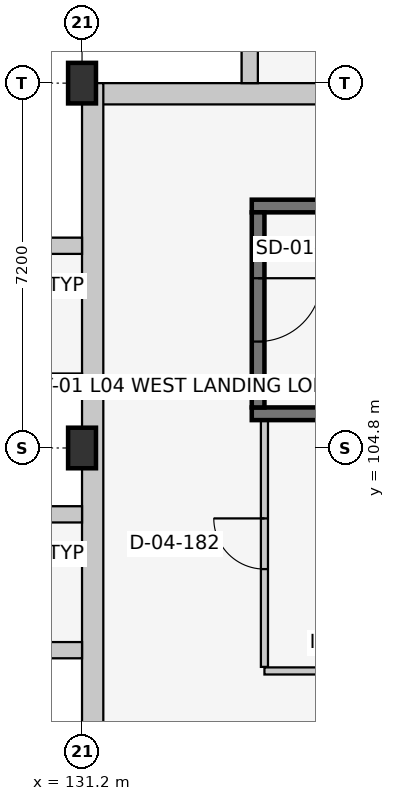
"""IFC4 building model, lengths in metres.
Left out: names, types, materials, properties, quantities, classifications, styles, units other than length and angle.
Written with IfcOpenShell. Run it as: python <this file> out.ifc"""

import sys

from ifc_helpers import new_model, si_unit, direction, frame, frame_2d, origin, origin_2d, place, context, subcontext, project, spatial, rectangle, extrude, element, fill, save


model = new_model("IFC4")
c1 = context("Model", 3, precision=1e-05, world=origin(), true_north=direction((0.0, 1.0)))
c2 = subcontext(c1, "Body", "Model", "MODEL_VIEW")
j1 = project(units=[si_unit("LENGTHUNIT", "METRE"), si_unit("PLANEANGLEUNIT", "RADIAN")], contexts=[c1])
p1 = place(None, origin())
s1 = spatial("IfcSite", under=j1, at=p1, CompositionType="ELEMENT")
p2 = place(p1, origin())
s2 = spatial("IfcBuilding", under=s1, at=p2, CompositionType="ELEMENT")
p3 = place(p2, frame((0.0, 0.0, 18.0)))
s3 = spatial("IfcBuildingStorey", under=s2, at=p3, CompositionType="ELEMENT", Elevation=18.0)
for number, where, z_axis, x_axis in (
    (1, (131.2, 104.8, 0.0), (0.0, 0.0, 1.0), (1.0, 0.0, 0.0)),
    (2, (131.2, 112.0, 0.0), (0.0, 0.0, 1.0), (1.0, 0.0, 0.0)),
):
    element("IfcColumn", number, at=place(p3, frame(where, z_axis=z_axis, x_axis=x_axis)), inside=s3, PredefinedType="COLUMN", context=c2, shape_type="SweptSolid", body=[
        extrude(rectangle(XDim=0.55, YDim=0.8, at=origin_2d()), origin(), (0.0, 0.0, 1.0), 3.9),
    ])
p4 = place(p3, frame((131.2, 111.79, 0.0), z_axis=(0.0, 0.0, 1.0), x_axis=(1.0, 0.0, 0.0)))
e3 = element("IfcWall", 3, at=p4, inside=s3, PredefinedType="SOLIDWALL", context=c2, shape_type="SweptSolid", body=[
    extrude(rectangle(XDim=28.8, YDim=0.42, at=frame_2d((14.4, 0.0))), origin(), (0.0, 0.0, 1.0), 2.955),
])
p5 = place(p3, frame((134.51, 112.0, 0.0), z_axis=(0.0, 0.0, 1.0), x_axis=(0.0, 1.0, 0.0)))
e4 = element("IfcWall", 4, at=p5, inside=s3, PredefinedType="SOLIDWALL", context=c2, shape_type="SweptSolid", body=[
    extrude(rectangle(XDim=1.35, YDim=0.32, at=frame_2d((0.675, 0.0))), origin(), (0.0, 0.0, 1.0), 3.64),
])
p6 = place(p3, frame((131.41, 83.2, 0.0), z_axis=(0.0, 0.0, 1.0), x_axis=(0.0, 1.0, 0.0)))
e5 = element("IfcWall", 5, at=p6, inside=s3, PredefinedType="SOLIDWALL", context=c2, shape_type="SweptSolid", body=[
    extrude(rectangle(XDim=28.8, YDim=0.42, at=frame_2d((14.4, 0.0))), origin(), (0.0, 0.0, 1.0), 3.055),
])
p7 = place(p3, frame((131.2, 100.81, 0.0), z_axis=(0.0, 0.0, 1.0), x_axis=(-1.0, 0.0, 0.0)))
e6 = element("IfcWall", 6, at=p7, inside=s3, PredefinedType="SOLIDWALL", context=c2, shape_type="SweptSolid", body=[
    extrude(rectangle(XDim=1.35, YDim=0.32, at=frame_2d((0.675, 0.0))), origin(), (0.0, 0.0, 1.0), 3.64),
])
for number, where, z_axis, x_axis in (
    (7, (131.2, 103.49, 0.0), (0.0, 0.0, 1.0), (-1.0, 0.0, 0.0)),
    (8, (131.2, 106.11, 0.0), (0.0, 0.0, 1.0), (-1.0, 0.0, 0.0)),
):
    element("IfcWall", number, at=place(p3, frame(where, z_axis=z_axis, x_axis=x_axis)), inside=s3, PredefinedType="SOLIDWALL", context=c2, shape_type="SweptSolid", body=[
        extrude(rectangle(XDim=1.793, YDim=0.32, at=frame_2d((0.896, 0.0))), origin(), (0.0, 0.0, 1.0), 3.64),
    ])
p8 = place(p3, frame((131.2, 108.79, 0.0), z_axis=(0.0, 0.0, 1.0), x_axis=(-1.0, 0.0, 0.0)))
e9 = element("IfcWall", 9, at=p8, inside=s3, PredefinedType="SOLIDWALL", context=c2, shape_type="SweptSolid", body=[
    extrude(rectangle(XDim=1.35, YDim=0.32, at=frame_2d((0.675, 0.0))), origin(), (0.0, 0.0, 1.0), 3.64),
])
for number, where, z_axis, x_axis in (
    (10, (134.55, 105.475, 0.0), (0.0, 0.0, 1.0), (1.0, 0.0, 0.0)),
    (11, (143.45, 109.575, 0.0), (0.0, 0.0, 1.0), (-1.0, 0.0, 0.0)),
):
    element("IfcWall", number, at=place(p3, frame(where, z_axis=z_axis, x_axis=x_axis)), inside=s3, PredefinedType="SHEAR", context=c2, shape_type="SweptSolid", body=[
        extrude(rectangle(XDim=8.9, YDim=0.25, at=frame_2d((4.45, 0.0))), origin(), (0.0, 0.0, 1.0), 3.66),
    ])
p9 = place(p3, frame((134.675, 109.45, 0.0), z_axis=(0.0, 0.0, 1.0), x_axis=(0.0, -1.0, 0.0)))
e12 = element("IfcWall", 12, at=p9, inside=s3, PredefinedType="SHEAR", context=c2, shape_type="SweptSolid", body=[
    extrude(rectangle(XDim=3.85, YDim=0.25, at=frame_2d((1.925, 0.0))), origin(), (0.0, 0.0, 1.0), 3.66),
])
p10 = place(p9, frame((1.3, 0.0, 0.0)))
e13 = element("IfcOpeningElement", 13, at=p10, cuts=e12, PredefinedType="OPENING", context=c2, shape_type="SweptSolid", body=[
    extrude(rectangle(XDim=1.25, YDim=2.15, at=frame_2d((0.625, 1.075))), frame((0.0, 0.137, 0.0), z_axis=(0.0, -1.0, 0.0), x_axis=(1.0, 0.0, 0.0)), (0.0, 0.0, 1.0), 0.274),
])
p11 = place(p3, frame((134.8, 100.4, 0.0), z_axis=(0.0, 0.0, 1.0), x_axis=(1.0, 0.0, 0.0)))
e14 = element("IfcWall", 14, at=p11, inside=s3, PredefinedType="PARTITIONING", context=c2, shape_type="SweptSolid", body=[
    extrude(rectangle(XDim=2.6, YDim=0.14, at=frame_2d((1.3, 0.0))), origin(), (0.0, 0.0, 1.0), 3.66),
])
p12 = place(p3, frame((134.8, 100.48, 0.0), z_axis=(0.0, 0.0, 1.0), x_axis=(0.0, 1.0, 0.0)))
e15 = element("IfcWall", 15, at=p12, inside=s3, PredefinedType="PARTITIONING", context=c2, shape_type="SweptSolid", body=[
    extrude(rectangle(XDim=4.86, YDim=0.14, at=frame_2d((2.43, 0.0))), origin(), (0.0, 0.0, 1.0), 3.445),
])
p13 = place(p12, frame((1.93, 0.0, 0.0)))
e16 = element("IfcOpeningElement", 16, at=p13, cuts=e15, PredefinedType="OPENING", context=c2, shape_type="SweptSolid", body=[
    extrude(rectangle(XDim=1.0, YDim=2.1, at=frame_2d((0.5, 1.05))), frame((0.0, 0.082, 0.0), z_axis=(0.0, -1.0, 0.0), x_axis=(1.0, 0.0, 0.0)), (0.0, 0.0, 1.0), 0.164),
])
p14 = place(p10, origin())
e17 = element("IfcDoor", 17, at=p14, inside=s3, OperationType="SINGLE_SWING_LEFT", PredefinedType="DOOR", context=c2, shape_type="SweptSolid", body=[
    extrude(rectangle(XDim=1.25, YDim=2.15, at=frame_2d((0.625, 1.075))), frame((0.0, 0.025, 0.0), z_axis=(0.0, -1.0, 0.0), x_axis=(1.0, 0.0, 0.0)), (0.0, 0.0, 1.0), 0.05),
])
fill(e13, e17)
p15 = place(p13, origin())
e18 = element("IfcDoor", 18, at=p15, inside=s3, OperationType="SINGLE_SWING_RIGHT", PredefinedType="DOOR", context=c2, shape_type="SweptSolid", body=[
    extrude(rectangle(XDim=1.0, YDim=2.1, at=frame_2d((0.5, 1.05))), frame((0.0, 0.025, 0.0), z_axis=(0.0, -1.0, 0.0), x_axis=(1.0, 0.0, 0.0)), (0.0, 0.0, 1.0), 0.05),
])
fill(e16, e18)
save(model, sys.argv[1])
